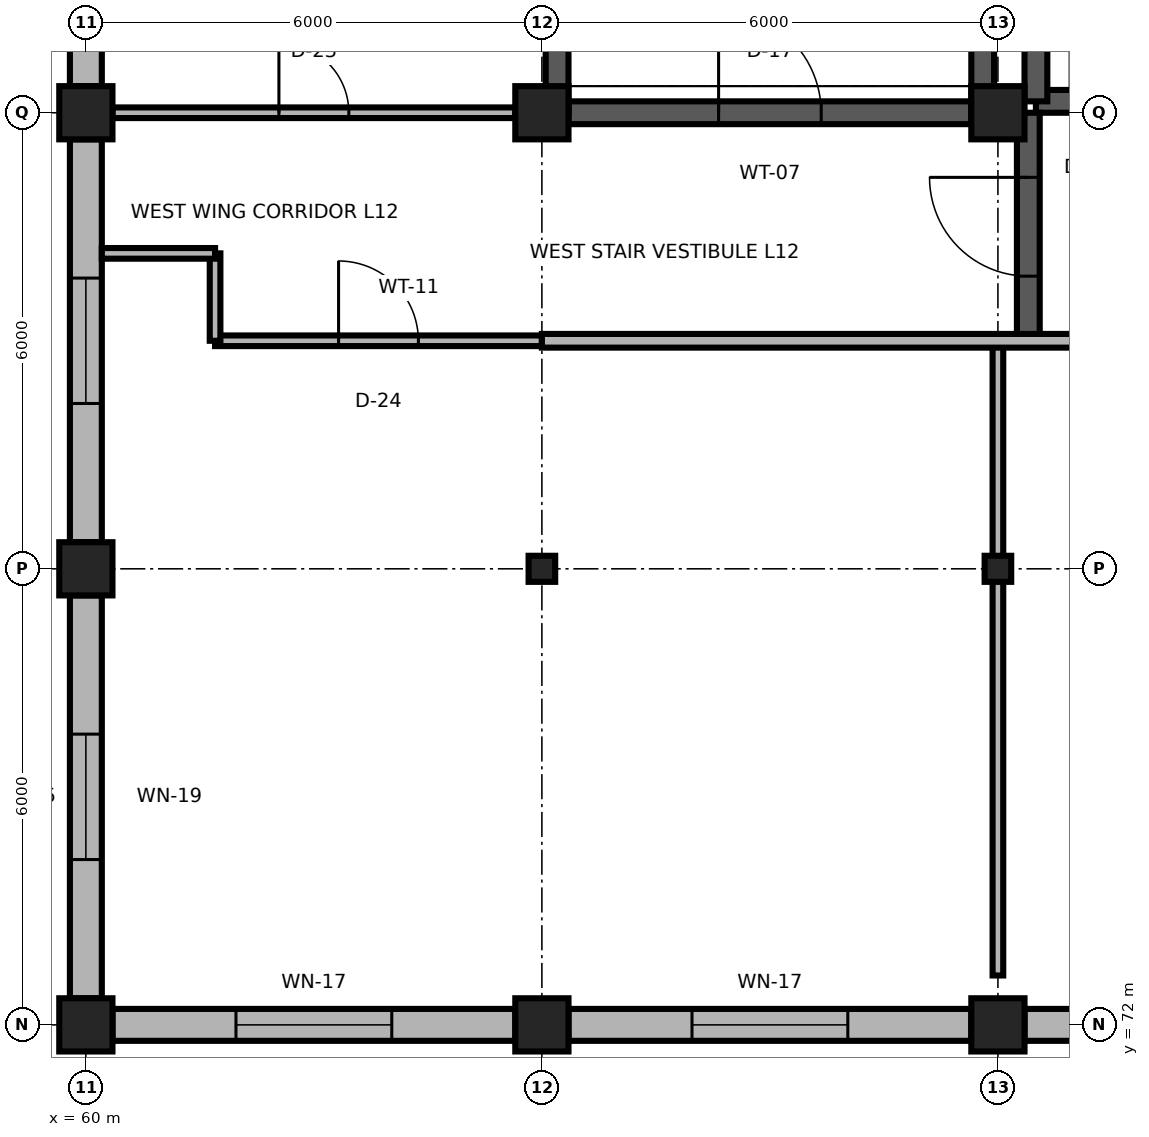
"""IFC4 building model, lengths in metres.
Left out: names, types, materials, properties, quantities, classifications, styles, units other than length and angle.
Written with IfcOpenShell. Run it as: python <this file> out.ifc"""

import sys

from ifc_helpers import new_model, si_unit, direction, frame, frame_2d, origin, origin_2d, place, context, subcontext, project, spatial, rectangle, i_section, extrude, element, fill, save


model = new_model("IFC4")
c1 = context("Model", 3, precision=1e-05, world=origin(), true_north=direction((0.0, 1.0)))
c2 = subcontext(c1, "Body", "Model", "MODEL_VIEW")
j1 = project(units=[si_unit("LENGTHUNIT", "METRE"), si_unit("PLANEANGLEUNIT", "RADIAN")], contexts=[c1])
p1 = place(None, origin())
s1 = spatial("IfcSite", under=j1, at=p1, CompositionType="ELEMENT")
p2 = place(p1, origin())
s2 = spatial("IfcBuilding", under=s1, at=p2, CompositionType="ELEMENT")
p3 = place(p2, frame((0.0, 0.0, 48.3)))
s3 = spatial("IfcBuildingStorey", under=s2, at=p3, CompositionType="ELEMENT", Elevation=48.3)
for number, where, z_axis, x_axis in (
    (1, (60.0, 72.0, 0.0), (0.0, 0.0, 1.0), (1.0, 0.0, 0.0)),
    (2, (66.0, 72.0, 0.0), (0.0, 0.0, 1.0), (1.0, 0.0, 0.0)),
    (3, (72.0, 72.0, 0.0), (0.0, 0.0, 1.0), (1.0, 0.0, 0.0)),
):
    element("IfcColumn", number, at=place(p3, frame(where, z_axis=z_axis, x_axis=x_axis)), inside=s3, PredefinedType="COLUMN", context=c2, shape_type="SweptSolid", body=[
        extrude(rectangle(XDim=0.7, YDim=0.7, at=origin_2d()), origin(), (0.0, 0.0, 1.0), 3.68),
    ])
p4 = place(p3, frame((60.0, 78.0, 0.0), z_axis=(0.0, 0.0, 1.0), x_axis=(1.0, 0.0, 0.0)))
e4 = element("IfcColumn", 4, at=p4, inside=s3, PredefinedType="COLUMN", context=c2, shape_type="SweptSolid", body=[
    extrude(rectangle(XDim=0.7, YDim=0.7, at=origin_2d()), origin(), (0.0, 0.0, 1.0), 3.9),
])
for number, where, z_axis, x_axis in (
    (5, (66.0, 78.0, 0.0), (0.0, 0.0, 1.0), (1.0, 0.0, 0.0)),
    (6, (72.0, 78.0, 0.0), (0.0, 0.0, 1.0), (1.0, 0.0, 0.0)),
):
    element("IfcColumn", number, at=place(p3, frame(where, z_axis=z_axis, x_axis=x_axis)), inside=s3, PredefinedType="COLUMN", context=c2, shape_type="SweptSolid", body=[
        extrude(i_section(OverallWidth=0.35, OverallDepth=0.343, WebThickness=0.01, FlangeThickness=0.015, FilletRadius=0.02, at=origin_2d()), origin(), (0.0, 0.0, 1.0), 3.9),
    ])
for number, where, z_axis, x_axis in (
    (7, (60.0, 84.0, 0.0), (0.0, 0.0, 1.0), (1.0, 0.0, 0.0)),
    (8, (66.0, 84.0, 0.0), (0.0, 0.0, 1.0), (1.0, 0.0, 0.0)),
    (9, (72.0, 84.0, 0.0), (0.0, 0.0, 1.0), (1.0, 0.0, 0.0)),
):
    element("IfcColumn", number, at=place(p3, frame(where, z_axis=z_axis, x_axis=x_axis)), inside=s3, PredefinedType="COLUMN", context=c2, shape_type="SweptSolid", body=[
        extrude(rectangle(XDim=0.7, YDim=0.7, at=origin_2d()), origin(), (0.0, 0.0, 1.0), 3.9),
    ])
p5 = place(p3, frame((60.35, 72.0, 0.0), z_axis=(0.0, 0.0, 1.0), x_axis=(1.0, 0.0, 0.0)))
e10 = element("IfcWall", 10, at=p5, inside=s3, PredefinedType="SOLIDWALL", context=c2, shape_type="SweptSolid", body=[
    extrude(rectangle(XDim=5.3, YDim=0.42, at=frame_2d((2.65, 0.0))), origin(), (0.0, 0.0, 1.0), 3.26),
])
p6 = place(p5, frame((1.625, 0.0, 0.85)))
e11 = element("IfcOpeningElement", 11, at=p6, cuts=e10, PredefinedType="OPENING", context=c2, shape_type="SweptSolid", body=[
    extrude(rectangle(XDim=2.05, YDim=2.0, at=frame_2d((1.025, 1.0))), frame((0.0, 0.225, 0.0), z_axis=(0.0, -1.0, 0.0), x_axis=(1.0, 0.0, 0.0)), (0.0, 0.0, 1.0), 0.45),
])
p7 = place(p3, frame((66.35, 72.0, 0.0), z_axis=(0.0, 0.0, 1.0), x_axis=(1.0, 0.0, 0.0)))
e12 = element("IfcWall", 12, at=p7, inside=s3, PredefinedType="SOLIDWALL", context=c2, shape_type="SweptSolid", body=[
    extrude(rectangle(XDim=5.3, YDim=0.42, at=frame_2d((2.65, 0.0))), origin(), (0.0, 0.0, 1.0), 3.26),
])
p8 = place(p7, frame((1.625, 0.0, 0.85)))
e13 = element("IfcOpeningElement", 13, at=p8, cuts=e12, PredefinedType="OPENING", context=c2, shape_type="SweptSolid", body=[
    extrude(rectangle(XDim=2.05, YDim=2.0, at=frame_2d((1.025, 1.0))), frame((0.0, 0.225, 0.0), z_axis=(0.0, -1.0, 0.0), x_axis=(1.0, 0.0, 0.0)), (0.0, 0.0, 1.0), 0.45),
])
p9 = place(p3, frame((72.35, 72.0, 0.0), z_axis=(0.0, 0.0, 1.0), x_axis=(1.0, 0.0, 0.0)))
e14 = element("IfcWall", 14, at=p9, inside=s3, PredefinedType="SOLIDWALL", context=c2, shape_type="SweptSolid", body=[
    extrude(rectangle(XDim=5.3, YDim=0.42, at=frame_2d((2.65, 0.0))), origin(), (0.0, 0.0, 1.0), 3.26),
])
p10 = place(p9, frame((1.625, 0.0, 0.85)))
e15 = element("IfcOpeningElement", 15, at=p10, cuts=e14, PredefinedType="OPENING", context=c2, shape_type="SweptSolid", body=[
    extrude(rectangle(XDim=2.05, YDim=2.0, at=frame_2d((1.025, 1.0))), frame((0.0, 0.225, 0.0), z_axis=(0.0, -1.0, 0.0), x_axis=(1.0, 0.0, 0.0)), (0.0, 0.0, 1.0), 0.45),
])
p11 = place(p3, frame((60.0, 72.35, 0.0), z_axis=(0.0, 0.0, 1.0), x_axis=(0.0, 1.0, 0.0)))
e16 = element("IfcWall", 16, at=p11, inside=s3, PredefinedType="SOLIDWALL", context=c2, shape_type="SweptSolid", body=[
    extrude(rectangle(XDim=5.3, YDim=0.42, at=frame_2d((2.65, 0.0))), origin(), (0.0, 0.0, 1.0), 3.26),
])
p12 = place(p11, frame((1.825, 0.0, 0.85)))
e17 = element("IfcOpeningElement", 17, at=p12, cuts=e16, PredefinedType="OPENING", context=c2, shape_type="SweptSolid", body=[
    extrude(rectangle(XDim=1.65, YDim=1.95, at=frame_2d((0.825, 0.975))), frame((0.0, 0.225, 0.0), z_axis=(0.0, -1.0, 0.0), x_axis=(1.0, 0.0, 0.0)), (0.0, 0.0, 1.0), 0.45),
])
p13 = place(p3, frame((60.0, 78.35, 0.0), z_axis=(0.0, 0.0, 1.0), x_axis=(0.0, 1.0, 0.0)))
e18 = element("IfcWall", 18, at=p13, inside=s3, PredefinedType="SOLIDWALL", context=c2, shape_type="SweptSolid", body=[
    extrude(rectangle(XDim=5.3, YDim=0.42, at=frame_2d((2.65, 0.0))), origin(), (0.0, 0.0, 1.0), 3.26),
])
p14 = place(p13, frame((1.825, 0.0, 0.85)))
e19 = element("IfcOpeningElement", 19, at=p14, cuts=e18, PredefinedType="OPENING", context=c2, shape_type="SweptSolid", body=[
    extrude(rectangle(XDim=1.65, YDim=1.95, at=frame_2d((0.825, 0.975))), frame((0.0, 0.225, 0.0), z_axis=(0.0, -1.0, 0.0), x_axis=(1.0, 0.0, 0.0)), (0.0, 0.0, 1.0), 0.45),
])
p15 = place(p3, frame((60.0, 84.35, 0.0), z_axis=(0.0, 0.0, 1.0), x_axis=(0.0, 1.0, 0.0)))
e20 = element("IfcWall", 20, at=p15, inside=s3, PredefinedType="SOLIDWALL", context=c2, shape_type="SweptSolid", body=[
    extrude(rectangle(XDim=5.3, YDim=0.42, at=frame_2d((2.65, 0.0))), origin(), (0.0, 0.0, 1.0), 3.26),
])
p16 = place(p15, frame((1.825, 0.0, 0.85)))
e21 = element("IfcOpeningElement", 21, at=p16, cuts=e20, PredefinedType="OPENING", context=c2, shape_type="SweptSolid", body=[
    extrude(rectangle(XDim=1.65, YDim=1.95, at=frame_2d((0.825, 0.975))), frame((0.0, 0.225, 0.0), z_axis=(0.0, -1.0, 0.0), x_axis=(1.0, 0.0, 0.0)), (0.0, 0.0, 1.0), 0.45),
])
p17 = place(p3, frame((66.35, 84.0, 0.0), z_axis=(0.0, 0.0, 1.0), x_axis=(1.0, 0.0, 0.0)))
e22 = element("IfcWall", 22, at=p17, inside=s3, PredefinedType="SHEAR", context=c2, shape_type="SweptSolid", body=[
    extrude(rectangle(XDim=5.3, YDim=0.3, at=frame_2d((2.65, 0.0))), origin(), (0.0, 0.0, 1.0), 3.66),
])
p18 = place(p17, frame((1.975, 0.0, 0.0)))
e23 = element("IfcOpeningElement", 23, at=p18, cuts=e22, PredefinedType="OPENING", context=c2, shape_type="SweptSolid", body=[
    extrude(rectangle(XDim=1.35, YDim=2.2, at=frame_2d((0.675, 1.1))), frame((0.0, 0.165, 0.0), z_axis=(0.0, -1.0, 0.0), x_axis=(1.0, 0.0, 0.0)), (0.0, 0.0, 1.0), 0.33),
])
for number, where, z_axis, x_axis in (
    (24, (66.2, 84.0, 0.0), (0.0, 0.0, 1.0), (0.0, 1.0, 0.0)),
    (25, (71.8, 84.0, 0.0), (0.0, 0.0, 1.0), (0.0, 1.0, 0.0)),
):
    element("IfcWall", number, at=place(p3, frame(where, z_axis=z_axis, x_axis=x_axis)), inside=s3, PredefinedType="SHEAR", context=c2, shape_type="SweptSolid", body=[
        extrude(rectangle(XDim=11.8, YDim=0.3, at=frame_2d((5.9, 0.0))), origin(), (0.0, 0.0, 1.0), 3.74),
    ])
p19 = place(p3, frame((72.5, 84.15, 0.0), z_axis=(0.0, 0.0, 1.0), x_axis=(1.0, 0.0, 0.0)))
e26 = element("IfcWall", 26, at=p19, inside=s3, PredefinedType="SHEAR", context=c2, shape_type="SweptSolid", body=[
    extrude(rectangle(XDim=2.5, YDim=0.3, at=frame_2d((1.25, 0.0))), origin(), (0.0, 0.0, 1.0), 3.74),
])
p20 = place(p19, frame((0.7, 0.0, 0.0)))
e27 = element("IfcOpeningElement", 27, at=p20, cuts=e26, PredefinedType="OPENING", context=c2, shape_type="SweptSolid", body=[
    extrude(rectangle(XDim=1.1, YDim=2.1, at=frame_2d((0.55, 1.05))), frame((0.0, 0.165, 0.0), z_axis=(0.0, -1.0, 0.0), x_axis=(1.0, 0.0, 0.0)), (0.0, 0.0, 1.0), 0.33),
])
p21 = place(p3, frame((72.5, 84.15, 0.0), z_axis=(0.0, 0.0, 1.0), x_axis=(0.0, 1.0, 0.0)))
e28 = element("IfcWall", 28, at=p21, inside=s3, PredefinedType="SHEAR", context=c2, shape_type="SweptSolid", body=[
    extrude(rectangle(XDim=3.4, YDim=0.3, at=frame_2d((1.7, 0.0))), origin(), (0.0, 0.0, 1.0), 3.74),
])
p22 = place(p3, frame((72.4, 81.0, 0.0), z_axis=(0.0, 0.0, 1.0), x_axis=(0.0, 1.0, 0.0)))
e29 = element("IfcWall", 29, at=p22, inside=s3, PredefinedType="SHEAR", context=c2, shape_type="SweptSolid", body=[
    extrude(rectangle(XDim=3.0, YDim=0.3, at=frame_2d((1.5, 0.0))), origin(), (0.0, 0.0, 1.0), 3.68),
])
p23 = place(p22, frame((0.85, 0.0, 0.0)))
e30 = element("IfcOpeningElement", 30, at=p23, cuts=e29, PredefinedType="OPENING", context=c2, shape_type="SweptSolid", body=[
    extrude(rectangle(XDim=1.3, YDim=2.2, at=frame_2d((0.65, 1.1))), frame((0.0, 0.165, 0.0), z_axis=(0.0, -1.0, 0.0), x_axis=(1.0, 0.0, 0.0)), (0.0, 0.0, 1.0), 0.33),
])
p24 = place(p3, frame((61.7, 81.0, 0.0), z_axis=(0.0, 0.0, 1.0), x_axis=(1.0, 0.0, 0.0)))
e31 = element("IfcWall", 31, at=p24, inside=s3, PredefinedType="PARTITIONING", context=c2, shape_type="SweptSolid", body=[
    extrude(rectangle(XDim=4.3, YDim=0.14, at=frame_2d((2.15, 0.0))), origin(), (0.0, 0.0, 1.0), 3.68),
])
p25 = place(p24, frame((1.625, 0.0, 0.0)))
e32 = element("IfcOpeningElement", 32, at=p25, cuts=e31, PredefinedType="OPENING", context=c2, shape_type="SweptSolid", body=[
    extrude(rectangle(XDim=1.05, YDim=2.25, at=frame_2d((0.525, 1.125))), frame((0.0, 0.085, 0.0), z_axis=(0.0, -1.0, 0.0), x_axis=(1.0, 0.0, 0.0)), (0.0, 0.0, 1.0), 0.17),
])
p26 = place(p3, frame((60.35, 84.0, 0.0), z_axis=(0.0, 0.0, 1.0), x_axis=(1.0, 0.0, 0.0)))
e33 = element("IfcWall", 33, at=p26, inside=s3, PredefinedType="PARTITIONING", context=c2, shape_type="SweptSolid", body=[
    extrude(rectangle(XDim=5.3, YDim=0.14, at=frame_2d((2.65, 0.0))), origin(), (0.0, 0.0, 1.0), 3.288),
])
p27 = place(p26, frame((2.19, 0.0, 0.0)))
e34 = element("IfcOpeningElement", 34, at=p27, cuts=e33, PredefinedType="OPENING", context=c2, shape_type="SweptSolid", body=[
    extrude(rectangle(XDim=0.92, YDim=2.15, at=frame_2d((0.46, 1.075))), frame((0.0, 0.085, 0.0), z_axis=(0.0, -1.0, 0.0), x_axis=(1.0, 0.0, 0.0)), (0.0, 0.0, 1.0), 0.17),
])
p28 = place(p3, frame((72.0, 72.65, 0.0), z_axis=(0.0, 0.0, 1.0), x_axis=(0.0, 1.0, 0.0)))
e35 = element("IfcWall", 35, at=p28, inside=s3, PredefinedType="PARTITIONING", context=c2, shape_type="SweptSolid", body=[
    extrude(rectangle(XDim=8.35, YDim=0.14, at=frame_2d((4.175, 0.0))), origin(), (0.0, 0.0, 1.0), 3.288),
])
p29 = place(p3, frame((66.0, 81.0, 0.0), z_axis=(0.0, 0.0, 1.0), x_axis=(1.0, 0.0, 0.0)))
e36 = element("IfcWall", 36, at=p29, inside=s3, PredefinedType="PARTITIONING", context=c2, shape_type="SweptSolid", body=[
    extrude(rectangle(XDim=18.0, YDim=0.18, at=frame_2d((9.0, 0.0))), origin(), (0.0, 0.0, 1.0), 3.68),
])
p30 = place(p3, frame((61.7, 81.0, 0.0), z_axis=(0.0, 0.0, 1.0), x_axis=(0.0, 1.0, 0.0)))
e37 = element("IfcWall", 37, at=p30, inside=s3, PredefinedType="PARTITIONING", context=c2, shape_type="SweptSolid", body=[
    extrude(rectangle(XDim=1.15, YDim=0.14, at=frame_2d((0.575, 0.0))), origin(), (0.0, 0.0, 1.0), 3.68),
])
p31 = place(p3, frame((61.7, 82.15, 0.0), z_axis=(0.0, 0.0, 1.0), x_axis=(-1.0, 0.0, 0.0)))
e38 = element("IfcWall", 38, at=p31, inside=s3, PredefinedType="PARTITIONING", context=c2, shape_type="SweptSolid", body=[
    extrude(rectangle(XDim=1.49, YDim=0.14, at=frame_2d((0.745, 0.0))), origin(), (0.0, 0.0, 1.0), 3.68),
])
p32 = place(p6, origin())
e39 = element("IfcWindow", 39, at=p32, inside=s3, PartitioningType="SINGLE_PANEL", PredefinedType="WINDOW", context=c2, shape_type="SweptSolid", body=[
    extrude(rectangle(XDim=2.05, YDim=2.0, at=frame_2d((1.025, 1.0))), frame((0.0, 0.03, 0.0), z_axis=(0.0, -1.0, 0.0), x_axis=(1.0, 0.0, 0.0)), (0.0, 0.0, 1.0), 0.06),
])
fill(e11, e39)
p33 = place(p8, origin())
e40 = element("IfcWindow", 40, at=p33, inside=s3, PartitioningType="SINGLE_PANEL", PredefinedType="WINDOW", context=c2, shape_type="SweptSolid", body=[
    extrude(rectangle(XDim=2.05, YDim=2.0, at=frame_2d((1.025, 1.0))), frame((0.0, 0.03, 0.0), z_axis=(0.0, -1.0, 0.0), x_axis=(1.0, 0.0, 0.0)), (0.0, 0.0, 1.0), 0.06),
])
fill(e13, e40)
p34 = place(p12, origin())
e41 = element("IfcWindow", 41, at=p34, inside=s3, PartitioningType="SINGLE_PANEL", PredefinedType="WINDOW", context=c2, shape_type="SweptSolid", body=[
    extrude(rectangle(XDim=1.65, YDim=1.95, at=frame_2d((0.825, 0.975))), frame((0.0, 0.03, 0.0), z_axis=(0.0, -1.0, 0.0), x_axis=(1.0, 0.0, 0.0)), (0.0, 0.0, 1.0), 0.06),
])
fill(e17, e41)
p35 = place(p14, origin())
e42 = element("IfcWindow", 42, at=p35, inside=s3, PartitioningType="SINGLE_PANEL", PredefinedType="WINDOW", context=c2, shape_type="SweptSolid", body=[
    extrude(rectangle(XDim=1.65, YDim=1.95, at=frame_2d((0.825, 0.975))), frame((0.0, 0.03, 0.0), z_axis=(0.0, -1.0, 0.0), x_axis=(1.0, 0.0, 0.0)), (0.0, 0.0, 1.0), 0.06),
])
fill(e19, e42)
p36 = place(p18, origin())
e43 = element("IfcDoor", 43, at=p36, inside=s3, OperationType="SINGLE_SWING_LEFT", PredefinedType="DOOR", context=c2, shape_type="SweptSolid", body=[
    extrude(rectangle(XDim=1.35, YDim=2.2, at=frame_2d((0.675, 1.1))), frame((0.0, 0.025, 0.0), z_axis=(0.0, -1.0, 0.0), x_axis=(1.0, 0.0, 0.0)), (0.0, 0.0, 1.0), 0.05),
])
fill(e23, e43)
p37 = place(p23, origin())
e44 = element("IfcDoor", 44, at=p37, inside=s3, OperationType="SINGLE_SWING_RIGHT", PredefinedType="DOOR", context=c2, shape_type="SweptSolid", body=[
    extrude(rectangle(XDim=1.3, YDim=2.2, at=frame_2d((0.65, 1.1))), frame((0.0, 0.025, 0.0), z_axis=(0.0, -1.0, 0.0), x_axis=(1.0, 0.0, 0.0)), (0.0, 0.0, 1.0), 0.05),
])
fill(e30, e44)
p38 = place(p25, origin())
e45 = element("IfcDoor", 45, at=p38, inside=s3, OperationType="SINGLE_SWING_LEFT", PredefinedType="DOOR", context=c2, shape_type="SweptSolid", body=[
    extrude(rectangle(XDim=1.05, YDim=2.25, at=frame_2d((0.525, 1.125))), frame((0.0, 0.025, 0.0), z_axis=(0.0, -1.0, 0.0), x_axis=(1.0, 0.0, 0.0)), (0.0, 0.0, 1.0), 0.05),
])
fill(e32, e45)
p39 = place(p27, origin())
e46 = element("IfcDoor", 46, at=p39, inside=s3, OperationType="SINGLE_SWING_LEFT", PredefinedType="DOOR", context=c2, shape_type="SweptSolid", body=[
    extrude(rectangle(XDim=0.92, YDim=2.15, at=frame_2d((0.46, 1.075))), frame((0.0, 0.025, 0.0), z_axis=(0.0, -1.0, 0.0), x_axis=(1.0, 0.0, 0.0)), (0.0, 0.0, 1.0), 0.05),
])
fill(e34, e46)
save(model, sys.argv[1])
